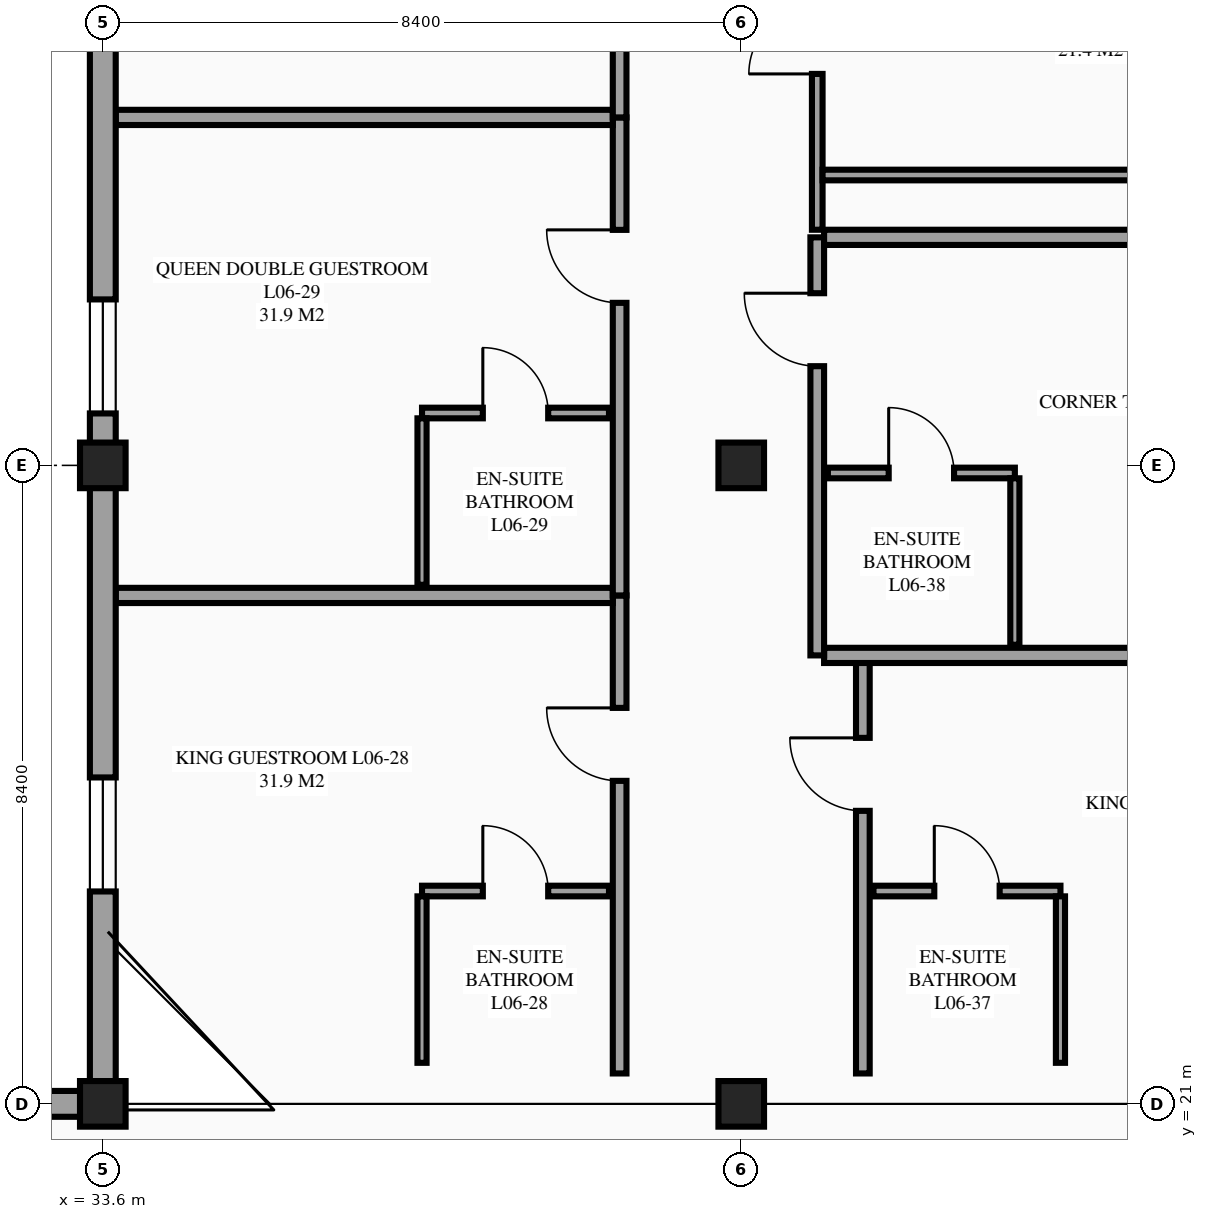
"""IFC4 building model, lengths in metres.
Left out: names, types, materials, properties, quantities, classifications, styles, units other than length and angle.
Written with IfcOpenShell. Run it as: python <this file> out.ifc"""

import sys

from ifc_helpers import new_model, si_unit, direction, frame, frame_2d, origin, origin_2d, place, context, subcontext, project, spatial, rectangle, extrude, element, fill, save


model = new_model("IFC4")
c1 = context("Model", 3, precision=1e-05, world=origin(), true_north=direction((0.0, 1.0)))
c2 = subcontext(c1, "Body", "Model", "MODEL_VIEW")
j1 = project(units=[si_unit("LENGTHUNIT", "METRE"), si_unit("PLANEANGLEUNIT", "RADIAN")], contexts=[c1])
p1 = place(None, origin())
s1 = spatial("IfcSite", under=j1, at=p1, CompositionType="ELEMENT")
p2 = place(p1, origin())
s2 = spatial("IfcBuilding", under=s1, at=p2, CompositionType="ELEMENT")
p3 = place(p2, frame((0.0, 0.0, 25.5)))
s3 = spatial("IfcBuildingStorey", under=s2, at=p3, CompositionType="ELEMENT", Elevation=25.5)
for number, where, z_axis, x_axis in (
    (1, (33.6, 21.0, 0.0), (0.0, 0.0, 1.0), (1.0, 0.0, 0.0)),
    (2, (33.6, 29.4, 0.0), (0.0, 0.0, 1.0), (1.0, 0.0, 0.0)),
    (3, (42.0, 21.0, 0.0), (0.0, 0.0, 1.0), (1.0, 0.0, 0.0)),
    (4, (42.0, 29.4, 0.0), (0.0, 0.0, 1.0), (1.0, 0.0, 0.0)),
):
    element("IfcColumn", number, at=place(p3, frame(where, z_axis=z_axis, x_axis=x_axis)), inside=s3, PredefinedType="COLUMN", context=c2, shape_type="SweptSolid", body=[
        extrude(rectangle(XDim=0.6, YDim=0.6, at=origin_2d()), origin(), (0.0, 0.0, 1.0), 3.6),
    ])
p4 = place(p3, frame((33.6, 21.0, 0.0), z_axis=(0.0, 0.0, 1.0), x_axis=(-1.0, 0.0, 0.0)))
e5 = element("IfcWall", 5, at=p4, inside=s3, PredefinedType="STANDARD", context=c2, shape_type="SweptSolid", body=[
    extrude(rectangle(XDim=2.0, YDim=0.34, at=frame_2d((1.0, 0.0))), origin(), (0.0, 0.0, 1.0), 2.73),
])
p5 = place(p3, frame((40.4, 21.4, 0.0), z_axis=(0.0, 0.0, 1.0), x_axis=(0.0, 1.0, 0.0)))
e6 = element("IfcWall", 6, at=p5, inside=s3, PredefinedType="PARTITIONING", context=c2, shape_type="SweptSolid", body=[
    extrude(rectangle(XDim=6.289, YDim=0.18, at=frame_2d((3.145, 0.0))), origin(), (0.0, 0.0, 1.0), 3.375),
])
p6 = place(p5, frame((3.849, 0.0, 0.0)))
e7 = element("IfcOpeningElement", 7, at=p6, cuts=e6, PredefinedType="OPENING", context=c2, shape_type="SweptSolid", body=[
    extrude(rectangle(XDim=0.96, YDim=2.15, at=frame_2d((0.48, 1.075))), frame((0.0, 0.1, 0.0), z_axis=(0.0, -1.0, 0.0), x_axis=(1.0, 0.0, 0.0)), (0.0, 0.0, 1.0), 0.2),
])
p7 = place(p3, frame((33.77, 27.689, 0.0), z_axis=(0.0, 0.0, 1.0), x_axis=(1.0, 0.0, 0.0)))
e8 = element("IfcWall", 8, at=p7, inside=s3, PredefinedType="PARTITIONING", context=c2, shape_type="SweptSolid", body=[
    extrude(rectangle(XDim=6.54, YDim=0.2, at=frame_2d((3.27, 0.0))), origin(), (0.0, 0.0, 1.0), 3.375),
])
p8 = place(p3, frame((37.8, 23.8, 0.0), z_axis=(0.0, 0.0, 1.0), x_axis=(1.0, 0.0, 0.0)))
e9 = element("IfcWall", 9, at=p8, inside=s3, PredefinedType="PARTITIONING", context=c2, shape_type="SweptSolid", body=[
    extrude(rectangle(XDim=2.46, YDim=0.14, at=frame_2d((1.23, 0.0))), origin(), (0.0, 0.0, 1.0), 3.375),
])
p9 = place(p8, frame((0.8, 0.0, 0.0)))
e10 = element("IfcOpeningElement", 10, at=p9, cuts=e9, PredefinedType="OPENING", context=c2, shape_type="SweptSolid", body=[
    extrude(rectangle(XDim=0.86, YDim=2.1, at=frame_2d((0.43, 1.05))), frame((0.0, 0.08, 0.0), z_axis=(0.0, -1.0, 0.0), x_axis=(1.0, 0.0, 0.0)), (0.0, 0.0, 1.0), 0.16),
])
p10 = place(p3, frame((37.8, 21.54, 0.0), z_axis=(0.0, 0.0, 1.0), x_axis=(0.0, 1.0, 0.0)))
e11 = element("IfcWall", 11, at=p10, inside=s3, PredefinedType="PARTITIONING", context=c2, shape_type="SweptSolid", body=[
    extrude(rectangle(XDim=2.19, YDim=0.12, at=frame_2d((1.095, 0.0))), origin(), (0.0, 0.0, 1.0), 3.375),
])
p11 = place(p3, frame((40.4, 27.689, 0.0), z_axis=(0.0, 0.0, 1.0), x_axis=(0.0, 1.0, 0.0)))
e12 = element("IfcWall", 12, at=p11, inside=s3, PredefinedType="PARTITIONING", context=c2, shape_type="SweptSolid", body=[
    extrude(rectangle(XDim=6.289, YDim=0.18, at=frame_2d((3.145, 0.0))), origin(), (0.0, 0.0, 1.0), 3.375),
])
p12 = place(p11, frame((3.849, 0.0, 0.0)))
e13 = element("IfcOpeningElement", 13, at=p12, cuts=e12, PredefinedType="OPENING", context=c2, shape_type="SweptSolid", body=[
    extrude(rectangle(XDim=0.96, YDim=2.15, at=frame_2d((0.48, 1.075))), frame((0.0, 0.1, 0.0), z_axis=(0.0, -1.0, 0.0), x_axis=(1.0, 0.0, 0.0)), (0.0, 0.0, 1.0), 0.2),
])
p13 = place(p3, frame((33.77, 33.978, 0.0), z_axis=(0.0, 0.0, 1.0), x_axis=(1.0, 0.0, 0.0)))
e14 = element("IfcWall", 14, at=p13, inside=s3, PredefinedType="PARTITIONING", context=c2, shape_type="SweptSolid", body=[
    extrude(rectangle(XDim=6.54, YDim=0.2, at=frame_2d((3.27, 0.0))), origin(), (0.0, 0.0, 1.0), 3.375),
])
p14 = place(p3, frame((37.8, 30.089, 0.0), z_axis=(0.0, 0.0, 1.0), x_axis=(1.0, 0.0, 0.0)))
e15 = element("IfcWall", 15, at=p14, inside=s3, PredefinedType="PARTITIONING", context=c2, shape_type="SweptSolid", body=[
    extrude(rectangle(XDim=2.46, YDim=0.14, at=frame_2d((1.23, 0.0))), origin(), (0.0, 0.0, 1.0), 3.375),
])
p15 = place(p14, frame((0.8, 0.0, 0.0)))
e16 = element("IfcOpeningElement", 16, at=p15, cuts=e15, PredefinedType="OPENING", context=c2, shape_type="SweptSolid", body=[
    extrude(rectangle(XDim=0.86, YDim=2.1, at=frame_2d((0.43, 1.05))), frame((0.0, 0.08, 0.0), z_axis=(0.0, -1.0, 0.0), x_axis=(1.0, 0.0, 0.0)), (0.0, 0.0, 1.0), 0.16),
])
p16 = place(p3, frame((37.8, 27.829, 0.0), z_axis=(0.0, 0.0, 1.0), x_axis=(0.0, 1.0, 0.0)))
e17 = element("IfcWall", 17, at=p16, inside=s3, PredefinedType="PARTITIONING", context=c2, shape_type="SweptSolid", body=[
    extrude(rectangle(XDim=2.19, YDim=0.12, at=frame_2d((1.095, 0.0))), origin(), (0.0, 0.0, 1.0), 3.375),
])
p17 = place(p3, frame((40.4, 33.978, 0.0), z_axis=(0.0, 0.0, 1.0), x_axis=(0.0, 1.0, 0.0)))
e18 = element("IfcWall", 18, at=p17, inside=s3, PredefinedType="PARTITIONING", context=c2, shape_type="SweptSolid", body=[
    extrude(rectangle(XDim=6.289, YDim=0.18, at=frame_2d((3.145, 0.0))), origin(), (0.0, 0.0, 1.0), 3.375),
])
p18 = place(p17, frame((1.479, 0.0, 0.0)))
e19 = element("IfcOpeningElement", 19, at=p18, cuts=e18, PredefinedType="OPENING", context=c2, shape_type="SweptSolid", body=[
    extrude(rectangle(XDim=0.96, YDim=2.15, at=frame_2d((0.48, 1.075))), frame((0.0, 0.1, 0.0), z_axis=(0.0, -1.0, 0.0), x_axis=(1.0, 0.0, 0.0)), (0.0, 0.0, 1.0), 0.2),
])
p19 = place(p3, frame((43.6, 21.4, 0.0), z_axis=(0.0, 0.0, 1.0), x_axis=(0.0, 1.0, 0.0)))
e20 = element("IfcWall", 20, at=p19, inside=s3, PredefinedType="PARTITIONING", context=c2, shape_type="SweptSolid", body=[
    extrude(rectangle(XDim=5.5, YDim=0.18, at=frame_2d((2.75, 0.0))), origin(), (0.0, 0.0, 1.0), 3.375),
])
p20 = place(p19, frame((3.455, 0.0, 0.0)))
e21 = element("IfcOpeningElement", 21, at=p20, cuts=e20, PredefinedType="OPENING", context=c2, shape_type="SweptSolid", body=[
    extrude(rectangle(XDim=0.96, YDim=2.15, at=frame_2d((0.48, 1.075))), frame((0.0, 0.1, 0.0), z_axis=(0.0, -1.0, 0.0), x_axis=(1.0, 0.0, 0.0)), (0.0, 0.0, 1.0), 0.2),
])
p21 = place(p3, frame((43.09, 26.9, 0.0), z_axis=(0.0, 0.0, 1.0), x_axis=(1.0, 0.0, 0.0)))
e22 = element("IfcWall", 22, at=p21, inside=s3, PredefinedType="PARTITIONING", context=c2, shape_type="SweptSolid", body=[
    extrude(rectangle(XDim=7.14, YDim=0.2, at=frame_2d((3.57, 0.0))), origin(), (0.0, 0.0, 1.0), 3.375),
])
p22 = place(p3, frame((43.74, 23.8, 0.0), z_axis=(0.0, 0.0, 1.0), x_axis=(1.0, 0.0, 0.0)))
e23 = element("IfcWall", 23, at=p22, inside=s3, PredefinedType="PARTITIONING", context=c2, shape_type="SweptSolid", body=[
    extrude(rectangle(XDim=2.46, YDim=0.14, at=frame_2d((1.23, 0.0))), origin(), (0.0, 0.0, 1.0), 3.375),
])
p23 = place(p22, frame((0.8, 0.0, 0.0)))
e24 = element("IfcOpeningElement", 24, at=p23, cuts=e23, PredefinedType="OPENING", context=c2, shape_type="SweptSolid", body=[
    extrude(rectangle(XDim=0.86, YDim=2.1, at=frame_2d((0.43, 1.05))), frame((0.0, 0.08, 0.0), z_axis=(0.0, -1.0, 0.0), x_axis=(1.0, 0.0, 0.0)), (0.0, 0.0, 1.0), 0.16),
])
p24 = place(p3, frame((46.2, 21.54, 0.0), z_axis=(0.0, 0.0, 1.0), x_axis=(0.0, 1.0, 0.0)))
e25 = element("IfcWall", 25, at=p24, inside=s3, PredefinedType="PARTITIONING", context=c2, shape_type="SweptSolid", body=[
    extrude(rectangle(XDim=2.19, YDim=0.12, at=frame_2d((1.095, 0.0))), origin(), (0.0, 0.0, 1.0), 3.375),
])
p25 = place(p3, frame((43.0, 26.9, 0.0), z_axis=(0.0, 0.0, 1.0), x_axis=(0.0, 1.0, 0.0)))
e26 = element("IfcWall", 26, at=p25, inside=s3, PredefinedType="PARTITIONING", context=c2, shape_type="SweptSolid", body=[
    extrude(rectangle(XDim=5.5, YDim=0.18, at=frame_2d((2.75, 0.0))), origin(), (0.0, 0.0, 1.0), 3.375),
])
p26 = place(p25, frame((3.805, 0.0, 0.0)))
e27 = element("IfcOpeningElement", 27, at=p26, cuts=e26, PredefinedType="OPENING", context=c2, shape_type="SweptSolid", body=[
    extrude(rectangle(XDim=0.96, YDim=2.15, at=frame_2d((0.48, 1.075))), frame((0.0, 0.1, 0.0), z_axis=(0.0, -1.0, 0.0), x_axis=(1.0, 0.0, 0.0)), (0.0, 0.0, 1.0), 0.2),
])
p27 = place(p3, frame((43.09, 32.4, 0.0), z_axis=(0.0, 0.0, 1.0), x_axis=(1.0, 0.0, 0.0)))
e28 = element("IfcWall", 28, at=p27, inside=s3, PredefinedType="PARTITIONING", context=c2, shape_type="SweptSolid", body=[
    extrude(rectangle(XDim=7.14, YDim=0.2, at=frame_2d((3.57, 0.0))), origin(), (0.0, 0.0, 1.0), 3.375),
])
p28 = place(p3, frame((43.14, 29.3, 0.0), z_axis=(0.0, 0.0, 1.0), x_axis=(1.0, 0.0, 0.0)))
e29 = element("IfcWall", 29, at=p28, inside=s3, PredefinedType="PARTITIONING", context=c2, shape_type="SweptSolid", body=[
    extrude(rectangle(XDim=2.46, YDim=0.14, at=frame_2d((1.23, 0.0))), origin(), (0.0, 0.0, 1.0), 2.58),
])
p29 = place(p28, frame((0.8, 0.0, 0.0)))
e30 = element("IfcOpeningElement", 30, at=p29, cuts=e29, PredefinedType="OPENING", context=c2, shape_type="SweptSolid", body=[
    extrude(rectangle(XDim=0.86, YDim=2.1, at=frame_2d((0.43, 1.05))), frame((0.0, 0.08, 0.0), z_axis=(0.0, -1.0, 0.0), x_axis=(1.0, 0.0, 0.0)), (0.0, 0.0, 1.0), 0.16),
])
p30 = place(p3, frame((45.6, 27.04, 0.0), z_axis=(0.0, 0.0, 1.0), x_axis=(0.0, 1.0, 0.0)))
e31 = element("IfcWall", 31, at=p30, inside=s3, PredefinedType="PARTITIONING", context=c2, shape_type="SweptSolid", body=[
    extrude(rectangle(XDim=2.19, YDim=0.12, at=frame_2d((1.095, 0.0))), origin(), (0.0, 0.0, 1.0), 3.375),
])
p31 = place(p3, frame((43.0, 32.5, 0.0), z_axis=(0.0, 0.0, 1.0), x_axis=(0.0, 1.0, 0.0)))
e32 = element("IfcWall", 32, at=p31, inside=s3, PredefinedType="PARTITIONING", context=c2, shape_type="SweptSolid", body=[
    extrude(rectangle(XDim=4.8, YDim=0.14, at=frame_2d((2.4, 0.0))), origin(), (0.0, 0.0, 1.0), 3.375),
])
p32 = place(p31, frame((2.05, 0.0, 0.0)))
e33 = element("IfcOpeningElement", 33, at=p32, cuts=e32, PredefinedType="OPENING", context=c2, shape_type="SweptSolid", body=[
    extrude(rectangle(XDim=0.9, YDim=2.12, at=frame_2d((0.45, 1.06))), frame((0.0, 0.08, 0.0), z_axis=(0.0, -1.0, 0.0), x_axis=(1.0, 0.0, 0.0)), (0.0, 0.0, 1.0), 0.16),
])
p33 = place(p3, frame((43.07, 33.22, 0.0), z_axis=(0.0, 0.0, 1.0), x_axis=(1.0, 0.0, 0.0)))
e34 = element("IfcWall", 34, at=p33, inside=s3, PredefinedType="PARTITIONING", context=c2, shape_type="SweptSolid", body=[
    extrude(rectangle(XDim=7.16, YDim=0.14, at=frame_2d((3.58, 0.0))), origin(), (0.0, 0.0, 1.0), 3.375),
])
p34 = place(p3, frame((33.6, 37.8, 0.0), z_axis=(0.0, 0.0, 1.0), x_axis=(0.0, -1.0, 0.0)))
e35 = element("IfcWall", 35, at=p34, inside=s3, PredefinedType="STANDARD", context=c2, shape_type="SweptSolid", body=[
    extrude(rectangle(XDim=8.4, YDim=0.34, at=frame_2d((4.2, 0.0))), origin(), (0.0, 0.0, 1.0), 2.58),
])
p35 = place(p34, frame((6.217, 0.0, 0.85)))
e36 = element("IfcOpeningElement", 36, at=p35, cuts=e35, PredefinedType="OPENING", context=c2, shape_type="SweptSolid", body=[
    extrude(rectangle(XDim=1.5, YDim=1.5, at=frame_2d((0.75, 0.75))), frame((0.0, 0.18, 0.0), z_axis=(0.0, -1.0, 0.0), x_axis=(1.0, 0.0, 0.0)), (0.0, 0.0, 1.0), 0.36),
])
p36 = place(p34, frame((0.678, 0.0, 0.85)))
e37 = element("IfcOpeningElement", 37, at=p36, cuts=e35, PredefinedType="OPENING", context=c2, shape_type="SweptSolid", body=[
    extrude(rectangle(XDim=1.5, YDim=1.5, at=frame_2d((0.75, 0.75))), frame((0.0, 0.18, 0.0), z_axis=(0.0, -1.0, 0.0), x_axis=(1.0, 0.0, 0.0)), (0.0, 0.0, 1.0), 0.36),
])
p37 = place(p3, frame((33.6, 29.4, 0.0), z_axis=(0.0, 0.0, 1.0), x_axis=(0.0, -1.0, 0.0)))
e38 = element("IfcWall", 38, at=p37, inside=s3, PredefinedType="STANDARD", context=c2, shape_type="SweptSolid", body=[
    extrude(rectangle(XDim=8.4, YDim=0.34, at=frame_2d((4.2, 0.0))), origin(), (0.0, 0.0, 1.0), 2.48),
])
p38 = place(p37, frame((4.106, 0.0, 0.85)))
e39 = element("IfcOpeningElement", 39, at=p38, cuts=e38, PredefinedType="OPENING", context=c2, shape_type="SweptSolid", body=[
    extrude(rectangle(XDim=1.5, YDim=1.5, at=frame_2d((0.75, 0.75))), frame((0.0, 0.18, 0.0), z_axis=(0.0, -1.0, 0.0), x_axis=(1.0, 0.0, 0.0)), (0.0, 0.0, 1.0), 0.36),
])
p39 = place(p38, origin())
e40 = element("IfcWindow", 40, at=p39, inside=s3, PartitioningType="SINGLE_PANEL", PredefinedType="WINDOW", context=c2, shape_type="SweptSolid", body=[
    extrude(rectangle(XDim=1.5, YDim=1.5, at=frame_2d((0.75, 0.75))), frame((0.0, 0.03, 0.0), z_axis=(0.0, -1.0, 0.0), x_axis=(1.0, 0.0, 0.0)), (0.0, 0.0, 1.0), 0.06),
])
fill(e39, e40)
p40 = place(p35, origin())
e41 = element("IfcWindow", 41, at=p40, inside=s3, PartitioningType="SINGLE_PANEL", PredefinedType="WINDOW", context=c2, shape_type="SweptSolid", body=[
    extrude(rectangle(XDim=1.5, YDim=1.5, at=frame_2d((0.75, 0.75))), frame((0.0, 0.03, 0.0), z_axis=(0.0, -1.0, 0.0), x_axis=(1.0, 0.0, 0.0)), (0.0, 0.0, 1.0), 0.06),
])
fill(e36, e41)
p41 = place(p6, origin())
e42 = element("IfcDoor", 42, at=p41, inside=s3, OperationType="SINGLE_SWING_RIGHT", PredefinedType="DOOR", context=c2, shape_type="SweptSolid", body=[
    extrude(rectangle(XDim=0.96, YDim=2.15, at=frame_2d((0.48, 1.075))), frame((0.0, 0.025, 0.0), z_axis=(0.0, -1.0, 0.0), x_axis=(1.0, 0.0, 0.0)), (0.0, 0.0, 1.0), 0.05),
])
fill(e7, e42)
p42 = place(p9, origin())
e43 = element("IfcDoor", 43, at=p42, inside=s3, OperationType="SINGLE_SWING_LEFT", PredefinedType="DOOR", context=c2, shape_type="SweptSolid", body=[
    extrude(rectangle(XDim=0.86, YDim=2.1, at=frame_2d((0.43, 1.05))), frame((0.0, 0.025, 0.0), z_axis=(0.0, -1.0, 0.0), x_axis=(1.0, 0.0, 0.0)), (0.0, 0.0, 1.0), 0.05),
])
fill(e10, e43)
p43 = place(p12, origin())
e44 = element("IfcDoor", 44, at=p43, inside=s3, OperationType="SINGLE_SWING_RIGHT", PredefinedType="DOOR", context=c2, shape_type="SweptSolid", body=[
    extrude(rectangle(XDim=0.96, YDim=2.15, at=frame_2d((0.48, 1.075))), frame((0.0, 0.025, 0.0), z_axis=(0.0, -1.0, 0.0), x_axis=(1.0, 0.0, 0.0)), (0.0, 0.0, 1.0), 0.05),
])
fill(e13, e44)
p44 = place(p15, origin())
e45 = element("IfcDoor", 45, at=p44, inside=s3, OperationType="SINGLE_SWING_LEFT", PredefinedType="DOOR", context=c2, shape_type="SweptSolid", body=[
    extrude(rectangle(XDim=0.86, YDim=2.1, at=frame_2d((0.43, 1.05))), frame((0.0, 0.025, 0.0), z_axis=(0.0, -1.0, 0.0), x_axis=(1.0, 0.0, 0.0)), (0.0, 0.0, 1.0), 0.05),
])
fill(e16, e45)
p45 = place(p20, origin())
e46 = element("IfcDoor", 46, at=p45, inside=s3, OperationType="SINGLE_SWING_RIGHT", PredefinedType="DOOR", context=c2, shape_type="SweptSolid", body=[
    extrude(rectangle(XDim=0.96, YDim=2.15, at=frame_2d((0.48, 1.075))), frame((0.0, 0.025, 0.0), z_axis=(0.0, -1.0, 0.0), x_axis=(1.0, 0.0, 0.0)), (0.0, 0.0, 1.0), 0.05),
])
fill(e21, e46)
p46 = place(p23, origin())
e47 = element("IfcDoor", 47, at=p46, inside=s3, OperationType="SINGLE_SWING_LEFT", PredefinedType="DOOR", context=c2, shape_type="SweptSolid", body=[
    extrude(rectangle(XDim=0.86, YDim=2.1, at=frame_2d((0.43, 1.05))), frame((0.0, 0.025, 0.0), z_axis=(0.0, -1.0, 0.0), x_axis=(1.0, 0.0, 0.0)), (0.0, 0.0, 1.0), 0.05),
])
fill(e24, e47)
p47 = place(p26, origin())
e48 = element("IfcDoor", 48, at=p47, inside=s3, OperationType="SINGLE_SWING_RIGHT", PredefinedType="DOOR", context=c2, shape_type="SweptSolid", body=[
    extrude(rectangle(XDim=0.96, YDim=2.15, at=frame_2d((0.48, 1.075))), frame((0.0, 0.025, 0.0), z_axis=(0.0, -1.0, 0.0), x_axis=(1.0, 0.0, 0.0)), (0.0, 0.0, 1.0), 0.05),
])
fill(e27, e48)
p48 = place(p29, origin())
e49 = element("IfcDoor", 49, at=p48, inside=s3, OperationType="SINGLE_SWING_LEFT", PredefinedType="DOOR", context=c2, shape_type="SweptSolid", body=[
    extrude(rectangle(XDim=0.86, YDim=2.1, at=frame_2d((0.43, 1.05))), frame((0.0, 0.025, 0.0), z_axis=(0.0, -1.0, 0.0), x_axis=(1.0, 0.0, 0.0)), (0.0, 0.0, 1.0), 0.05),
])
fill(e30, e49)
p49 = place(p32, origin())
e50 = element("IfcDoor", 50, at=p49, inside=s3, OperationType="SINGLE_SWING_LEFT", PredefinedType="DOOR", context=c2, shape_type="SweptSolid", body=[
    extrude(rectangle(XDim=0.9, YDim=2.12, at=frame_2d((0.45, 1.06))), frame((0.0, 0.025, 0.0), z_axis=(0.0, -1.0, 0.0), x_axis=(1.0, 0.0, 0.0)), (0.0, 0.0, 1.0), 0.05),
])
fill(e33, e50)
save(model, sys.argv[1])
